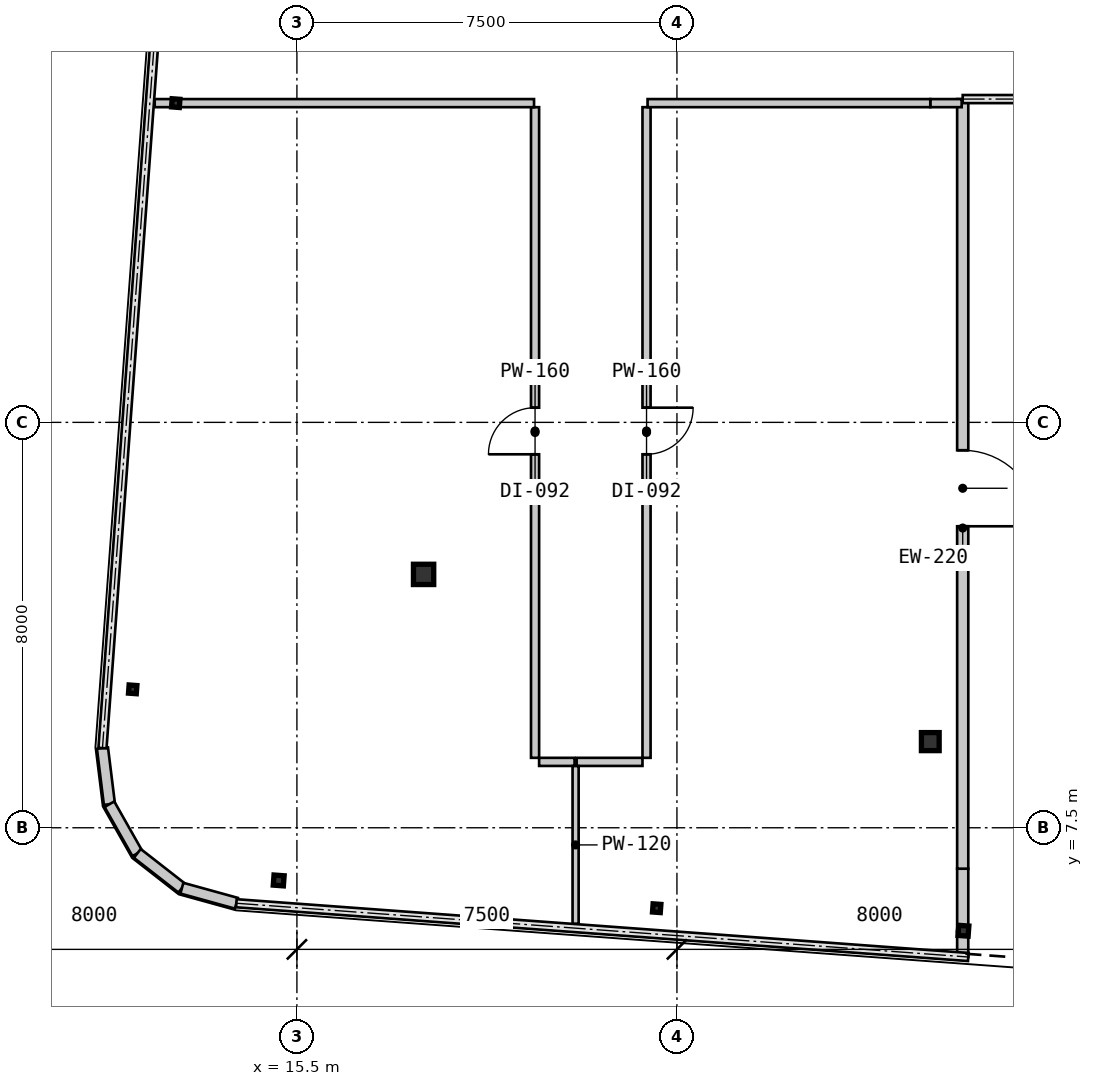
"""IFC4 building model, lengths in metres.
Left out: names, types, materials, properties, quantities, classifications, styles, units other than length and angle.
Written with IfcOpenShell. Run it as: python <this file> out.ifc"""

import sys

from ifc_helpers import new_model, si_unit, direction, frame, frame_2d, origin, origin_2d, place, context, subcontext, project, spatial, rectangle, hollow_rectangle, i_section, extrude, source, transform, mapped, element, fill, save


model = new_model("IFC4")
c1 = context("Model", 3, precision=1e-05, world=origin(), true_north=direction((0.0, 1.0)))
c2 = subcontext(c1, "Body", "Model", "MODEL_VIEW")
j1 = project(units=[si_unit("LENGTHUNIT", "METRE"), si_unit("PLANEANGLEUNIT", "RADIAN")], contexts=[c1])
p1 = place(None, origin())
s1 = spatial("IfcSite", under=j1, at=p1, CompositionType="ELEMENT")
p2 = place(p1, origin())
s2 = spatial("IfcBuilding", under=s1, at=p2, CompositionType="ELEMENT")
p3 = place(p2, frame((0.0, 0.0, 227.15)))
s3 = spatial("IfcBuildingStorey", under=s2, at=p3, CompositionType="ELEMENT", Elevation=227.15)
m1 = source(origin(), c2, "Body", "SweptSolid", [
    extrude(i_section(OverallWidth=0.35, OverallDepth=0.356, WebThickness=0.018, FlangeThickness=0.028, at=origin_2d()), origin(), (0.0, 0.0, 1.0), 3.15),
])
p4 = place(p3, frame((28.0, 9.2, 0.0), z_axis=(0.0, 0.0, 1.0), x_axis=(1.0, 0.0, 0.0)))
e1 = element("IfcColumn", 1, at=p4, inside=s3, PredefinedType="COLUMN", context=c2, shape_type="MappedRepresentation", body=[
    mapped(m1, transform((0.0, 0.0, 0.0), scale=1.0)),
])
m2 = source(origin(), c2, "Body", "SweptSolid", [
    extrude(hollow_rectangle(XDim=0.4, YDim=0.4, WallThickness=0.016, at=origin_2d()), origin(), (0.0, 0.0, 1.0), 3.15),
])
p5 = place(p3, frame((18.0, 12.5, 0.0), z_axis=(0.0, 0.0, 1.0), x_axis=(1.0, 0.0, 0.0)))
e2 = element("IfcColumn", 2, at=p5, inside=s3, PredefinedType="COLUMN", context=c2, shape_type="MappedRepresentation", body=[
    mapped(m2, transform((0.0, 0.0, 0.0), scale=1.0)),
])
m3 = source(origin(), c2, "Body", "SweptSolid", [
    extrude(hollow_rectangle(XDim=0.2, YDim=0.2, WallThickness=0.009, at=origin_2d()), origin(), (0.0, 0.0, 1.0), 3.15),
])
p6 = place(p3, frame((15.141, 6.46, 0.0), z_axis=(0.0, 0.0, 1.0), x_axis=(0.997314477224, -0.073238197128, 0.0)))
e3 = element("IfcColumn", 3, at=p6, inside=s3, PredefinedType="COLUMN", context=c2, shape_type="MappedRepresentation", body=[
    mapped(m3, transform((0.0, 0.0, 0.0), scale=1.0)),
])
m4 = source(origin(), c2, "Body", "SweptSolid", [
    extrude(i_section(OverallWidth=0.154, OverallDepth=0.162, WebThickness=0.008, FlangeThickness=0.011, at=origin_2d()), origin(), (0.0, 0.0, 1.0), 3.15),
])
for number, where, z_axis, x_axis in (
    (4, (22.601, 5.912, 0.0), (0.0, 0.0, 1.0), (0.997, -0.073, 0.0)),
    (5, (12.259, 10.231, 0.0), (0.0, 0.0, 1.0), (0.997, -0.073, 0.0)),
    (6, (13.109, 21.8, 0.0), (0.0, 0.0, 1.0), (0.997, -0.073, 0.0)),
):
    element("IfcColumn", number, at=place(p3, frame(where, z_axis=z_axis, x_axis=x_axis)), inside=s3, PredefinedType="COLUMN", context=c2, shape_type="MappedRepresentation", body=[
        mapped(m4, transform((0.0, 0.0, 0.0), scale=1.0)),
    ])
p7 = place(p3, frame((28.654, 5.468, 0.0), z_axis=(0.0, 0.0, 1.0), x_axis=(0.997314477224, -0.073238197128, 0.0)))
e7 = element("IfcColumn", 7, at=p7, inside=s3, PredefinedType="COLUMN", context=c2, shape_type="MappedRepresentation", body=[
    mapped(m3, transform((0.0, 0.0, 0.0), scale=1.0)),
])
m5 = source(origin(), c2, "Body", "SweptSolid", [
    extrude(rectangle(XDim=1.116, YDim=0.22, at=frame_2d((0.558, 0.0))), origin(), (0.0, 0.0, 1.0), 2.93),
])
for number, where, z_axis, x_axis in (
    (8, (11.663, 9.072, 0.0), (0.0, 0.0, 1.0), (0.123, -0.992, 0.0)),
    (9, (11.8, 7.965, 0.0), (0.0, 0.0, 1.0), (0.493, -0.87, 0.0)),
    (10, (12.35, 6.994, 0.0), (0.0, 0.0, 1.0), (0.789, -0.615, 0.0)),
):
    element("IfcWall", number, at=place(p3, frame(where, z_axis=z_axis, x_axis=x_axis)), inside=s3, PredefinedType="SOLIDWALL", context=c2, shape_type="MappedRepresentation", body=[
        mapped(m5, transform((0.0, 0.0, 0.0), scale=1.0)),
    ])
m6 = source(origin(), c2, "Body", "SweptSolid", [
    extrude(rectangle(XDim=1.116, YDim=0.22, at=frame_2d((0.558, 0.0))), origin(), (0.0, 0.0, 1.0), 2.93),
])
p8 = place(p3, frame((13.23, 6.307, 0.0), z_axis=(0.0, 0.0, 1.0), x_axis=(0.963890028874, -0.266300605026, 0.0)))
e11 = element("IfcWall", 11, at=p8, inside=s3, PredefinedType="SOLIDWALL", context=c2, shape_type="MappedRepresentation", body=[
    mapped(m6, transform((0.0, 0.0, 0.0), scale=1.0)),
])
m7 = source(origin(), c2, "Body", "SweptSolid", [
    extrude(rectangle(XDim=0.503, YDim=0.22, at=frame_2d((0.251, 0.0))), origin(), (0.0, 0.0, 1.0), 2.93),
])
p9 = place(p3, frame((28.64, 4.949, 0.0), z_axis=(0.0, 0.0, 1.0), x_axis=(0.0, 1.0, 0.0)))
e12 = element("IfcWall", 12, at=p9, inside=s3, PredefinedType="SOLIDWALL", context=c2, shape_type="MappedRepresentation", body=[
    mapped(m7, transform((0.0, 0.0, 0.0), scale=1.0)),
])
m8 = source(origin(), c2, "Body", "SweptSolid", [
    extrude(rectangle(XDim=1.24, YDim=0.22, at=frame_2d((0.62, 0.0))), origin(), (0.0, 0.0, 1.0), 2.524),
])
p10 = place(p3, frame((28.64, 5.452, 0.0), z_axis=(0.0, 0.0, 1.0), x_axis=(0.0, 1.0, 0.0)))
e13 = element("IfcWall", 13, at=p10, inside=s3, PredefinedType="SOLIDWALL", context=c2, shape_type="MappedRepresentation", body=[
    mapped(m8, transform((0.0, 0.0, 0.0), scale=1.0)),
])
m9 = source(origin(), c2, "Body", "SweptSolid", [
    extrude(rectangle(XDim=15.188, YDim=0.22, at=frame_2d((7.594, 0.0))), origin(), (0.0, 0.0, 1.0), 2.93),
])
p11 = place(p3, frame((28.64, 6.692, 0.0), z_axis=(0.0, 0.0, 1.0), x_axis=(0.0, 1.0, 0.0)))
e14 = element("IfcWall", 14, at=p11, inside=s3, PredefinedType="SOLIDWALL", context=c2, shape_type="MappedRepresentation", body=[
    mapped(m9, transform((0.0, 0.0, 0.0), scale=1.0)),
])
m10 = source(origin(), c2, "Body", "SweptSolid", [
    extrude(rectangle(XDim=1.5, YDim=2.2, at=frame_2d((0.75, 1.1))), frame((0.0, 0.12, 0.0), z_axis=(0.0, -1.0, 0.0), x_axis=(1.0, 0.0, 0.0)), (0.0, 0.0, 1.0), 0.24),
])
p12 = place(p11, frame((6.757, 0.0, 0.0)))
e15 = element("IfcOpeningElement", 15, at=p12, cuts=e14, PredefinedType="OPENING", context=c2, shape_type="MappedRepresentation", body=[
    mapped(m10, transform((0.0, 0.0, 0.0), scale=1.0)),
])
m11 = source(origin(), c2, "Body", "SweptSolid", [
    extrude(rectangle(XDim=12.84, YDim=0.16, at=frame_2d((6.42, 0.0))), origin(), (0.0, 0.0, 1.0), 2.93),
])
p13 = place(p3, frame((22.4, 21.72, 0.0), z_axis=(0.0, 0.0, 1.0), x_axis=(0.0, -1.0, 0.0)))
e16 = element("IfcWall", 16, at=p13, inside=s3, PredefinedType="PARTITIONING", context=c2, shape_type="MappedRepresentation", body=[
    mapped(m11, transform((0.0, 0.0, 0.0), scale=1.0)),
])
m12 = source(origin(), c2, "Body", "SweptSolid", [
    extrude(rectangle(XDim=0.92, YDim=2.1, at=frame_2d((0.46, 1.05))), frame((0.0, 0.09, 0.0), z_axis=(0.0, -1.0, 0.0), x_axis=(1.0, 0.0, 0.0)), (0.0, 0.0, 1.0), 0.18),
])
p14 = place(p13, frame((5.93, 0.0, 0.0)))
e17 = element("IfcOpeningElement", 17, at=p14, cuts=e16, PredefinedType="OPENING", context=c2, shape_type="MappedRepresentation", body=[
    mapped(m12, transform((0.0, 0.0, 0.0), scale=1.0)),
])
m13 = source(origin(), c2, "Body", "SweptSolid", [
    extrude(rectangle(XDim=0.62, YDim=0.16, at=frame_2d((0.31, 0.0))), origin(), (0.0, 0.0, 1.0), 2.23),
])
p15 = place(p3, frame((28.62, 21.8, 0.0), z_axis=(0.0, 0.0, 1.0), x_axis=(-1.0, 0.0, 0.0)))
e18 = element("IfcWall", 18, at=p15, inside=s3, PredefinedType="PARTITIONING", context=c2, shape_type="MappedRepresentation", body=[
    mapped(m13, transform((0.0, 0.0, 0.0), scale=1.0)),
])
m14 = source(origin(), c2, "Body", "SweptSolid", [
    extrude(rectangle(XDim=5.58, YDim=0.16, at=frame_2d((2.79, 0.0))), origin(), (0.0, 0.0, 1.0), 2.93),
])
p16 = place(p3, frame((28.0, 21.8, 0.0), z_axis=(0.0, 0.0, 1.0), x_axis=(-1.0, 0.0, 0.0)))
e19 = element("IfcWall", 19, at=p16, inside=s3, PredefinedType="PARTITIONING", context=c2, shape_type="MappedRepresentation", body=[
    mapped(m14, transform((0.0, 0.0, 0.0), scale=1.0)),
])
m15 = source(origin(), c2, "Body", "SweptSolid", [
    extrude(rectangle(XDim=1.3, YDim=0.16, at=frame_2d((0.65, 0.0))), origin(), (0.0, 0.0, 1.0), 2.93),
])
p17 = place(p3, frame((22.32, 8.8, 0.0), z_axis=(0.0, 0.0, 1.0), x_axis=(-1.0, 0.0, 0.0)))
e20 = element("IfcWall", 20, at=p17, inside=s3, PredefinedType="PARTITIONING", context=c2, shape_type="MappedRepresentation", body=[
    mapped(m15, transform((0.0, 0.0, 0.0), scale=1.0)),
])
p18 = place(p3, frame((20.2, 8.88, 0.0), z_axis=(0.0, 0.0, 1.0), x_axis=(0.0, 1.0, 0.0)))
e21 = element("IfcWall", 21, at=p18, inside=s3, PredefinedType="PARTITIONING", context=c2, shape_type="MappedRepresentation", body=[
    mapped(m11, transform((0.0, 0.0, 0.0), scale=1.0)),
])
p19 = place(p18, frame((5.99, 0.0, 0.0)))
e22 = element("IfcOpeningElement", 22, at=p19, cuts=e21, PredefinedType="OPENING", context=c2, shape_type="MappedRepresentation", body=[
    mapped(m12, transform((0.0, 0.0, 0.0), scale=1.0)),
])
m16 = source(origin(), c2, "Body", "SweptSolid", [
    extrude(rectangle(XDim=7.486, YDim=0.16, at=frame_2d((3.743, 0.0))), origin(), (0.0, 0.0, 1.0), 2.93),
])
p20 = place(p3, frame((20.18, 21.8, 0.0), z_axis=(0.0, 0.0, 1.0), x_axis=(-1.0, 0.0, 0.0)))
e23 = element("IfcWall", 23, at=p20, inside=s3, PredefinedType="PARTITIONING", context=c2, shape_type="MappedRepresentation", body=[
    mapped(m16, transform((0.0, 0.0, 0.0), scale=1.0)),
])
m17 = source(origin(), c2, "Body", "SweptSolid", [
    extrude(rectangle(XDim=0.7, YDim=0.16, at=frame_2d((0.35, 0.0))), origin(), (0.0, 0.0, 1.0), 2.93),
])
p21 = place(p3, frame((20.98, 8.8, 0.0), z_axis=(0.0, 0.0, 1.0), x_axis=(-1.0, 0.0, 0.0)))
e24 = element("IfcWall", 24, at=p21, inside=s3, PredefinedType="PARTITIONING", context=c2, shape_type="MappedRepresentation", body=[
    mapped(m17, transform((0.0, 0.0, 0.0), scale=1.0)),
])
m18 = source(origin(), c2, "Body", "SweptSolid", [
    extrude(rectangle(XDim=3.113, YDim=0.12, at=frame_2d((1.557, 0.0))), origin(), (0.0, 0.0, 1.0), 2.93),
])
p22 = place(p3, frame((21.0, 5.605, 0.0), z_axis=(0.0, 0.0, 1.0), x_axis=(0.0, 1.0, 0.0)))
e25 = element("IfcWall", 25, at=p22, inside=s3, PredefinedType="PARTITIONING", context=c2, shape_type="MappedRepresentation", body=[
    mapped(m18, transform((0.0, 0.0, 0.0), scale=1.0)),
])
m19 = source(origin(), c2, "Body", "SweptSolid", [
    extrude(rectangle(XDim=1.5, YDim=2.2, at=frame_2d((0.75, 1.1))), frame((0.0, 0.025, 0.0), z_axis=(0.0, -1.0, 0.0), x_axis=(1.0, 0.0, 0.0)), (0.0, 0.0, 1.0), 0.05),
])
p23 = place(p12, frame((1.5, 0.0, 0.0), z_axis=(0.0, 0.0, 1.0), x_axis=(-1.0, 0.0, 0.0)))
e26 = element("IfcDoor", 26, at=p23, inside=s3, OperationType="SINGLE_SWING_RIGHT", PredefinedType="DOOR", context=c2, shape_type="MappedRepresentation", body=[
    mapped(m19, transform((0.0, 0.0, 0.0), scale=1.0)),
])
fill(e15, e26)
m20 = source(origin(), c2, "Body", "SweptSolid", [
    extrude(rectangle(XDim=0.92, YDim=2.1, at=frame_2d((0.46, 1.05))), frame((0.0, 0.025, 0.0), z_axis=(0.0, -1.0, 0.0), x_axis=(1.0, 0.0, 0.0)), (0.0, 0.0, 1.0), 0.05),
])
p24 = place(p14, origin())
e27 = element("IfcDoor", 27, at=p24, inside=s3, OperationType="SINGLE_SWING_LEFT", PredefinedType="DOOR", context=c2, shape_type="MappedRepresentation", body=[
    mapped(m20, transform((0.0, 0.0, 0.0), scale=1.0)),
])
fill(e17, e27)
p25 = place(p19, origin())
e28 = element("IfcDoor", 28, at=p25, inside=s3, OperationType="SINGLE_SWING_LEFT", PredefinedType="DOOR", context=c2, shape_type="MappedRepresentation", body=[
    mapped(m20, transform((0.0, 0.0, 0.0), scale=1.0)),
])
fill(e22, e28)
save(model, sys.argv[1])
